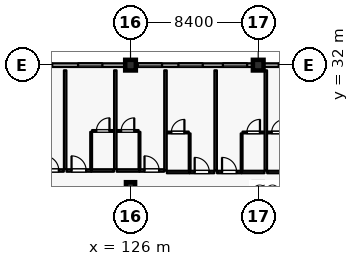
"""IFC4 building model, lengths in metres.
Left out: names, types, materials, properties, quantities, classifications, styles, units other than length and angle.
Written with IfcOpenShell. Run it as: python <this file> out.ifc"""

import sys

from ifc_helpers import new_model, si_unit, direction, frame, frame_2d, origin, origin_2d, place, context, subcontext, project, spatial, rectangle, extrude, element, fill, save


model = new_model("IFC4")
c1 = context("Model", 3, precision=1e-05, world=origin(), true_north=direction((0.0, 1.0)))
c2 = subcontext(c1, "Body", "Model", "MODEL_VIEW")
j1 = project(units=[si_unit("LENGTHUNIT", "METRE"), si_unit("PLANEANGLEUNIT", "RADIAN")], contexts=[c1])
p1 = place(None, origin())
s1 = spatial("IfcSite", under=j1, at=p1, CompositionType="ELEMENT")
p2 = place(p1, origin())
s2 = spatial("IfcBuilding", under=s1, at=p2, CompositionType="ELEMENT")
p3 = place(p2, frame((0.0, 0.0, 32.4)))
s3 = spatial("IfcBuildingStorey", under=s2, at=p3, CompositionType="ELEMENT", Elevation=32.4)
for number, where, z_axis, x_axis in (
    (1, (126.0, 32.0, 0.0), (0.0, 0.0, 1.0), (1.0, 0.0, 0.0)),
    (2, (134.4, 32.0, 0.0), (0.0, 0.0, 1.0), (1.0, 0.0, 0.0)),
):
    element("IfcColumn", number, at=place(p3, frame(where, z_axis=z_axis, x_axis=x_axis)), inside=s3, PredefinedType="COLUMN", context=c2, shape_type="SweptSolid", body=[
        extrude(rectangle(XDim=0.7, YDim=0.7, at=origin_2d()), origin(), (0.0, 0.0, 1.0), 3.6),
    ])
for number, where, z_axis, x_axis in (
    (3, (126.0, 24.0, 0.0), (0.0, 0.0, 1.0), (1.0, 0.0, 0.0)),
    (4, (134.4, 24.0, 0.0), (0.0, 0.0, 1.0), (1.0, 0.0, 0.0)),
):
    element("IfcColumn", number, at=place(p3, frame(where, z_axis=z_axis, x_axis=x_axis)), inside=s3, PredefinedType="COLUMN", context=c2, shape_type="SweptSolid", body=[
        extrude(rectangle(XDim=0.6, YDim=0.6, at=origin_2d()), origin(), (0.0, 0.0, 1.0), 3.6),
    ])
p4 = place(p3, frame((117.95, 32.0, 0.0), z_axis=(0.0, 0.0, 1.0), x_axis=(1.0, 0.0, 0.0)))
e5 = element("IfcWall", 5, at=p4, inside=s3, PredefinedType="SOLIDWALL", context=c2, shape_type="SweptSolid", body=[
    extrude(rectangle(XDim=7.7, YDim=0.24, at=frame_2d((3.85, 0.0))), origin(), (0.0, 0.0, 1.0), 2.94),
])
p5 = place(p4, frame((1.3, 0.0, 0.8)))
e6 = element("IfcOpeningElement", 6, at=p5, cuts=e5, PredefinedType="OPENING", context=c2, shape_type="SweptSolid", body=[
    extrude(rectangle(XDim=1.6, YDim=1.6, at=frame_2d((0.8, 0.8))), frame((0.0, 0.13, 0.0), z_axis=(0.0, -1.0, 0.0), x_axis=(1.0, 0.0, 0.0)), (0.0, 0.0, 1.0), 0.26),
])
p6 = place(p4, frame((4.6, 0.0, 0.8)))
e7 = element("IfcOpeningElement", 7, at=p6, cuts=e5, PredefinedType="OPENING", context=c2, shape_type="SweptSolid", body=[
    extrude(rectangle(XDim=1.6, YDim=1.6, at=frame_2d((0.8, 0.8))), frame((0.0, 0.13, 0.0), z_axis=(0.0, -1.0, 0.0), x_axis=(1.0, 0.0, 0.0)), (0.0, 0.0, 1.0), 0.26),
])
p7 = place(p3, frame((126.35, 32.0, 0.0), z_axis=(0.0, 0.0, 1.0), x_axis=(1.0, 0.0, 0.0)))
e8 = element("IfcWall", 8, at=p7, inside=s3, PredefinedType="SOLIDWALL", context=c2, shape_type="SweptSolid", body=[
    extrude(rectangle(XDim=7.7, YDim=0.24, at=frame_2d((3.85, 0.0))), origin(), (0.0, 0.0, 1.0), 2.94),
])
p8 = place(p7, frame((0.125, 0.0, 0.8)))
e9 = element("IfcOpeningElement", 9, at=p8, cuts=e8, PredefinedType="OPENING", context=c2, shape_type="SweptSolid", body=[
    extrude(rectangle(XDim=1.6, YDim=1.6, at=frame_2d((0.8, 0.8))), frame((0.0, 0.13, 0.0), z_axis=(0.0, -1.0, 0.0), x_axis=(1.0, 0.0, 0.0)), (0.0, 0.0, 1.0), 0.26),
])
p9 = place(p7, frame((2.8, 0.0, 0.8)))
e10 = element("IfcOpeningElement", 10, at=p9, cuts=e8, PredefinedType="OPENING", context=c2, shape_type="SweptSolid", body=[
    extrude(rectangle(XDim=1.6, YDim=1.6, at=frame_2d((0.8, 0.8))), frame((0.0, 0.13, 0.0), z_axis=(0.0, -1.0, 0.0), x_axis=(1.0, 0.0, 0.0)), (0.0, 0.0, 1.0), 0.26),
])
p10 = place(p7, frame((5.725, 0.0, 0.8)))
e11 = element("IfcOpeningElement", 11, at=p10, cuts=e8, PredefinedType="OPENING", context=c2, shape_type="SweptSolid", body=[
    extrude(rectangle(XDim=1.6, YDim=1.6, at=frame_2d((0.8, 0.8))), frame((0.0, 0.13, 0.0), z_axis=(0.0, -1.0, 0.0), x_axis=(1.0, 0.0, 0.0)), (0.0, 0.0, 1.0), 0.26),
])
p11 = place(p3, frame((134.75, 32.0, 0.0), z_axis=(0.0, 0.0, 1.0), x_axis=(1.0, 0.0, 0.0)))
e12 = element("IfcWall", 12, at=p11, inside=s3, PredefinedType="SOLIDWALL", context=c2, shape_type="SweptSolid", body=[
    extrude(rectangle(XDim=7.7, YDim=0.24, at=frame_2d((3.85, 0.0))), origin(), (0.0, 0.0, 1.0), 2.94),
])
p12 = place(p11, frame((1.0, 0.0, 0.8)))
e13 = element("IfcOpeningElement", 13, at=p12, cuts=e12, PredefinedType="OPENING", context=c2, shape_type="SweptSolid", body=[
    extrude(rectangle(XDim=1.6, YDim=1.6, at=frame_2d((0.8, 0.8))), frame((0.0, 0.13, 0.0), z_axis=(0.0, -1.0, 0.0), x_axis=(1.0, 0.0, 0.0)), (0.0, 0.0, 1.0), 0.26),
])
p13 = place(p11, frame((4.3, 0.0, 0.8)))
e14 = element("IfcOpeningElement", 14, at=p13, cuts=e12, PredefinedType="OPENING", context=c2, shape_type="SweptSolid", body=[
    extrude(rectangle(XDim=1.6, YDim=1.6, at=frame_2d((0.8, 0.8))), frame((0.0, 0.13, 0.0), z_axis=(0.0, -1.0, 0.0), x_axis=(1.0, 0.0, 0.0)), (0.0, 0.0, 1.0), 0.26),
])
p14 = place(p3, frame((119.99, 25.07, 0.0), z_axis=(0.0, 0.0, 1.0), x_axis=(1.0, 0.0, 0.0)))
e15 = element("IfcWall", 15, at=p14, inside=s3, PredefinedType="PARTITIONING", context=c2, shape_type="SweptSolid", body=[
    extrude(rectangle(XDim=1.62, YDim=0.16, at=frame_2d((0.81, 0.0))), origin(), (0.0, 0.0, 1.0), 3.335),
])
p15 = place(p14, frame((0.33, 0.0, 0.0)))
e16 = element("IfcOpeningElement", 16, at=p15, cuts=e15, PredefinedType="OPENING", context=c2, shape_type="SweptSolid", body=[
    extrude(rectangle(XDim=0.96, YDim=2.2, at=frame_2d((0.48, 1.1))), frame((0.0, 0.09, 0.0), z_axis=(0.0, -1.0, 0.0), x_axis=(1.0, 0.0, 0.0)), (0.0, 0.0, 1.0), 0.18),
])
p16 = place(p3, frame((121.79, 25.07, 0.0), z_axis=(0.0, 0.0, 1.0), x_axis=(1.0, 0.0, 0.0)))
e17 = element("IfcWall", 17, at=p16, inside=s3, PredefinedType="PARTITIONING", context=c2, shape_type="SweptSolid", body=[
    extrude(rectangle(XDim=1.62, YDim=0.16, at=frame_2d((0.81, 0.0))), origin(), (0.0, 0.0, 1.0), 3.335),
])
p17 = place(p16, frame((0.33, 0.0, 0.0)))
e18 = element("IfcOpeningElement", 18, at=p17, cuts=e17, PredefinedType="OPENING", context=c2, shape_type="SweptSolid", body=[
    extrude(rectangle(XDim=0.96, YDim=2.2, at=frame_2d((0.48, 1.1))), frame((0.0, 0.09, 0.0), z_axis=(0.0, -1.0, 0.0), x_axis=(1.0, 0.0, 0.0)), (0.0, 0.0, 1.0), 0.18),
])
p18 = place(p3, frame((123.42, 25.07, 0.0), z_axis=(0.0, 0.0, 1.0), x_axis=(1.0, 0.0, 0.0)))
e19 = element("IfcWall", 19, at=p18, inside=s3, PredefinedType="PARTITIONING", context=c2, shape_type="SweptSolid", body=[
    extrude(rectangle(XDim=1.49, YDim=0.16, at=frame_2d((0.745, 0.0))), origin(), (0.0, 0.0, 1.0), 3.335),
])
p19 = place(p3, frame((123.41, 25.16, 0.0), z_axis=(0.0, 0.0, 1.0), x_axis=(0.0, 1.0, 0.0)))
e20 = element("IfcWall", 20, at=p19, inside=s3, PredefinedType="PARTITIONING", context=c2, shape_type="SweptSolid", body=[
    extrude(rectangle(XDim=2.45, YDim=0.115, at=frame_2d((1.225, 0.0))), origin(), (0.0, 0.0, 1.0), 3.335),
])
p20 = place(p3, frame((123.47, 27.67, 0.0), z_axis=(0.0, 0.0, 1.0), x_axis=(1.0, 0.0, 0.0)))
e21 = element("IfcWall", 21, at=p20, inside=s3, PredefinedType="PARTITIONING", context=c2, shape_type="SweptSolid", body=[
    extrude(rectangle(XDim=1.43, YDim=0.115, at=frame_2d((0.715, 0.0))), origin(), (0.0, 0.0, 1.0), 3.335),
])
p21 = place(p20, frame((0.285, 0.0, 0.0)))
e22 = element("IfcOpeningElement", 22, at=p21, cuts=e21, PredefinedType="OPENING", context=c2, shape_type="SweptSolid", body=[
    extrude(rectangle(XDim=0.86, YDim=2.12, at=frame_2d((0.43, 1.06))), frame((0.0, 0.067, 0.0), z_axis=(0.0, -1.0, 0.0), x_axis=(1.0, 0.0, 0.0)), (0.0, 0.0, 1.0), 0.135),
])
p22 = place(p3, frame((121.7, 25.16, 0.0), z_axis=(0.0, 0.0, 1.0), x_axis=(0.0, 1.0, 0.0)))
e23 = element("IfcWall", 23, at=p22, inside=s3, PredefinedType="PARTITIONING", context=c2, shape_type="SweptSolid", body=[
    extrude(rectangle(XDim=6.5, YDim=0.16, at=frame_2d((3.25, 0.0))), origin(), (0.0, 0.0, 1.0), 3.335),
])
p23 = place(p3, frame((125.09, 25.07, 0.0), z_axis=(0.0, 0.0, 1.0), x_axis=(1.0, 0.0, 0.0)))
e24 = element("IfcWall", 24, at=p23, inside=s3, PredefinedType="PARTITIONING", context=c2, shape_type="SweptSolid", body=[
    extrude(rectangle(XDim=1.49, YDim=0.16, at=frame_2d((0.745, 0.0))), origin(), (0.0, 0.0, 1.0), 3.335),
])
p24 = place(p3, frame((126.59, 25.07, 0.0), z_axis=(0.0, 0.0, 1.0), x_axis=(1.0, 0.0, 0.0)))
e25 = element("IfcWall", 25, at=p24, inside=s3, PredefinedType="PARTITIONING", context=c2, shape_type="SweptSolid", body=[
    extrude(rectangle(XDim=1.62, YDim=0.16, at=frame_2d((0.81, 0.0))), origin(), (0.0, 0.0, 1.0), 3.335),
])
p25 = place(p24, frame((0.33, 0.0, 0.0)))
e26 = element("IfcOpeningElement", 26, at=p25, cuts=e25, PredefinedType="OPENING", context=c2, shape_type="SweptSolid", body=[
    extrude(rectangle(XDim=0.96, YDim=2.2, at=frame_2d((0.48, 1.1))), frame((0.0, 0.09, 0.0), z_axis=(0.0, -1.0, 0.0), x_axis=(1.0, 0.0, 0.0)), (0.0, 0.0, 1.0), 0.18),
])
p26 = place(p3, frame((126.59, 25.16, 0.0), z_axis=(0.0, 0.0, 1.0), x_axis=(0.0, 1.0, 0.0)))
e27 = element("IfcWall", 27, at=p26, inside=s3, PredefinedType="PARTITIONING", context=c2, shape_type="SweptSolid", body=[
    extrude(rectangle(XDim=2.45, YDim=0.115, at=frame_2d((1.225, 0.0))), origin(), (0.0, 0.0, 1.0), 3.335),
])
p27 = place(p3, frame((125.1, 27.67, 0.0), z_axis=(0.0, 0.0, 1.0), x_axis=(1.0, 0.0, 0.0)))
e28 = element("IfcWall", 28, at=p27, inside=s3, PredefinedType="PARTITIONING", context=c2, shape_type="SweptSolid", body=[
    extrude(rectangle(XDim=1.43, YDim=0.115, at=frame_2d((0.715, 0.0))), origin(), (0.0, 0.0, 1.0), 3.335),
])
p28 = place(p27, frame((0.285, 0.0, 0.0)))
e29 = element("IfcOpeningElement", 29, at=p28, cuts=e28, PredefinedType="OPENING", context=c2, shape_type="SweptSolid", body=[
    extrude(rectangle(XDim=0.86, YDim=2.12, at=frame_2d((0.43, 1.06))), frame((0.0, 0.067, 0.0), z_axis=(0.0, -1.0, 0.0), x_axis=(1.0, 0.0, 0.0)), (0.0, 0.0, 1.0), 0.135),
])
p29 = place(p3, frame((125.0, 25.16, 0.0), z_axis=(0.0, 0.0, 1.0), x_axis=(0.0, 1.0, 0.0)))
e30 = element("IfcWall", 30, at=p29, inside=s3, PredefinedType="PARTITIONING", context=c2, shape_type="SweptSolid", body=[
    extrude(rectangle(XDim=6.5, YDim=0.16, at=frame_2d((3.25, 0.0))), origin(), (0.0, 0.0, 1.0), 3.335),
])
p30 = place(p3, frame((128.39, 24.97, 0.0), z_axis=(0.0, 0.0, 1.0), x_axis=(1.0, 0.0, 0.0)))
e31 = element("IfcWall", 31, at=p30, inside=s3, PredefinedType="PARTITIONING", context=c2, shape_type="SweptSolid", body=[
    extrude(rectangle(XDim=1.49, YDim=0.16, at=frame_2d((0.745, 0.0))), origin(), (0.0, 0.0, 1.0), 3.335),
])
p31 = place(p3, frame((129.89, 24.97, 0.0), z_axis=(0.0, 0.0, 1.0), x_axis=(1.0, 0.0, 0.0)))
e32 = element("IfcWall", 32, at=p31, inside=s3, PredefinedType="PARTITIONING", context=c2, shape_type="SweptSolid", body=[
    extrude(rectangle(XDim=1.62, YDim=0.16, at=frame_2d((0.81, 0.0))), origin(), (0.0, 0.0, 1.0), 3.335),
])
p32 = place(p31, frame((0.33, 0.0, 0.0)))
e33 = element("IfcOpeningElement", 33, at=p32, cuts=e32, PredefinedType="OPENING", context=c2, shape_type="SweptSolid", body=[
    extrude(rectangle(XDim=0.96, YDim=2.2, at=frame_2d((0.48, 1.1))), frame((0.0, 0.09, 0.0), z_axis=(0.0, -1.0, 0.0), x_axis=(1.0, 0.0, 0.0)), (0.0, 0.0, 1.0), 0.18),
])
p33 = place(p3, frame((129.89, 25.06, 0.0), z_axis=(0.0, 0.0, 1.0), x_axis=(0.0, 1.0, 0.0)))
e34 = element("IfcWall", 34, at=p33, inside=s3, PredefinedType="PARTITIONING", context=c2, shape_type="SweptSolid", body=[
    extrude(rectangle(XDim=2.45, YDim=0.115, at=frame_2d((1.225, 0.0))), origin(), (0.0, 0.0, 1.0), 3.335),
])
p34 = place(p3, frame((128.4, 27.57, 0.0), z_axis=(0.0, 0.0, 1.0), x_axis=(1.0, 0.0, 0.0)))
e35 = element("IfcWall", 35, at=p34, inside=s3, PredefinedType="PARTITIONING", context=c2, shape_type="SweptSolid", body=[
    extrude(rectangle(XDim=1.43, YDim=0.115, at=frame_2d((0.715, 0.0))), origin(), (0.0, 0.0, 1.0), 3.335),
])
p35 = place(p34, frame((0.285, 0.0, 0.0)))
e36 = element("IfcOpeningElement", 36, at=p35, cuts=e35, PredefinedType="OPENING", context=c2, shape_type="SweptSolid", body=[
    extrude(rectangle(XDim=0.86, YDim=2.12, at=frame_2d((0.43, 1.06))), frame((0.0, 0.067, 0.0), z_axis=(0.0, -1.0, 0.0), x_axis=(1.0, 0.0, 0.0)), (0.0, 0.0, 1.0), 0.135),
])
p36 = place(p3, frame((128.3, 25.06, 0.0), z_axis=(0.0, 0.0, 1.0), x_axis=(0.0, 1.0, 0.0)))
e37 = element("IfcWall", 37, at=p36, inside=s3, PredefinedType="PARTITIONING", context=c2, shape_type="SweptSolid", body=[
    extrude(rectangle(XDim=6.6, YDim=0.16, at=frame_2d((3.3, 0.0))), origin(), (0.0, 0.0, 1.0), 3.335),
])
p37 = place(p3, frame((131.69, 24.97, 0.0), z_axis=(0.0, 0.0, 1.0), x_axis=(1.0, 0.0, 0.0)))
e38 = element("IfcWall", 38, at=p37, inside=s3, PredefinedType="PARTITIONING", context=c2, shape_type="SweptSolid", body=[
    extrude(rectangle(XDim=1.62, YDim=0.16, at=frame_2d((0.81, 0.0))), origin(), (0.0, 0.0, 1.0), 3.335),
])
p38 = place(p37, frame((0.33, 0.0, 0.0)))
e39 = element("IfcOpeningElement", 39, at=p38, cuts=e38, PredefinedType="OPENING", context=c2, shape_type="SweptSolid", body=[
    extrude(rectangle(XDim=0.96, YDim=2.2, at=frame_2d((0.48, 1.1))), frame((0.0, 0.09, 0.0), z_axis=(0.0, -1.0, 0.0), x_axis=(1.0, 0.0, 0.0)), (0.0, 0.0, 1.0), 0.18),
])
p39 = place(p3, frame((133.32, 24.97, 0.0), z_axis=(0.0, 0.0, 1.0), x_axis=(1.0, 0.0, 0.0)))
e40 = element("IfcWall", 40, at=p39, inside=s3, PredefinedType="PARTITIONING", context=c2, shape_type="SweptSolid", body=[
    extrude(rectangle(XDim=1.49, YDim=0.16, at=frame_2d((0.745, 0.0))), origin(), (0.0, 0.0, 1.0), 3.335),
])
p40 = place(p3, frame((133.31, 25.06, 0.0), z_axis=(0.0, 0.0, 1.0), x_axis=(0.0, 1.0, 0.0)))
e41 = element("IfcWall", 41, at=p40, inside=s3, PredefinedType="PARTITIONING", context=c2, shape_type="SweptSolid", body=[
    extrude(rectangle(XDim=2.45, YDim=0.115, at=frame_2d((1.225, 0.0))), origin(), (0.0, 0.0, 1.0), 3.335),
])
p41 = place(p3, frame((133.37, 27.57, 0.0), z_axis=(0.0, 0.0, 1.0), x_axis=(1.0, 0.0, 0.0)))
e42 = element("IfcWall", 42, at=p41, inside=s3, PredefinedType="PARTITIONING", context=c2, shape_type="SweptSolid", body=[
    extrude(rectangle(XDim=1.43, YDim=0.115, at=frame_2d((0.715, 0.0))), origin(), (0.0, 0.0, 1.0), 3.335),
])
p42 = place(p41, frame((0.285, 0.0, 0.0)))
e43 = element("IfcOpeningElement", 43, at=p42, cuts=e42, PredefinedType="OPENING", context=c2, shape_type="SweptSolid", body=[
    extrude(rectangle(XDim=0.86, YDim=2.12, at=frame_2d((0.43, 1.06))), frame((0.0, 0.067, 0.0), z_axis=(0.0, -1.0, 0.0), x_axis=(1.0, 0.0, 0.0)), (0.0, 0.0, 1.0), 0.135),
])
p43 = place(p3, frame((131.6, 25.06, 0.0), z_axis=(0.0, 0.0, 1.0), x_axis=(0.0, 1.0, 0.0)))
e44 = element("IfcWall", 44, at=p43, inside=s3, PredefinedType="PARTITIONING", context=c2, shape_type="SweptSolid", body=[
    extrude(rectangle(XDim=6.6, YDim=0.16, at=frame_2d((3.3, 0.0))), origin(), (0.0, 0.0, 1.0), 3.335),
])
p44 = place(p3, frame((134.99, 24.97, 0.0), z_axis=(0.0, 0.0, 1.0), x_axis=(1.0, 0.0, 0.0)))
e45 = element("IfcWall", 45, at=p44, inside=s3, PredefinedType="PARTITIONING", context=c2, shape_type="SweptSolid", body=[
    extrude(rectangle(XDim=1.49, YDim=0.16, at=frame_2d((0.745, 0.0))), origin(), (0.0, 0.0, 1.0), 3.335),
])
p45 = place(p3, frame((135.0, 27.57, 0.0), z_axis=(0.0, 0.0, 1.0), x_axis=(1.0, 0.0, 0.0)))
e46 = element("IfcWall", 46, at=p45, inside=s3, PredefinedType="PARTITIONING", context=c2, shape_type="SweptSolid", body=[
    extrude(rectangle(XDim=1.43, YDim=0.115, at=frame_2d((0.715, 0.0))), origin(), (0.0, 0.0, 1.0), 3.335),
])
p46 = place(p45, frame((0.285, 0.0, 0.0)))
e47 = element("IfcOpeningElement", 47, at=p46, cuts=e46, PredefinedType="OPENING", context=c2, shape_type="SweptSolid", body=[
    extrude(rectangle(XDim=0.86, YDim=2.12, at=frame_2d((0.43, 1.06))), frame((0.0, 0.067, 0.0), z_axis=(0.0, -1.0, 0.0), x_axis=(1.0, 0.0, 0.0)), (0.0, 0.0, 1.0), 0.135),
])
p47 = place(p3, frame((134.9, 25.06, 0.0), z_axis=(0.0, 0.0, 1.0), x_axis=(0.0, 1.0, 0.0)))
e48 = element("IfcWall", 48, at=p47, inside=s3, PredefinedType="PARTITIONING", context=c2, shape_type="SweptSolid", body=[
    extrude(rectangle(XDim=6.6, YDim=0.16, at=frame_2d((3.3, 0.0))), origin(), (0.0, 0.0, 1.0), 3.335),
])
p48 = place(p5, origin())
e49 = element("IfcWindow", 49, at=p48, inside=s3, PartitioningType="SINGLE_PANEL", PredefinedType="WINDOW", context=c2, shape_type="SweptSolid", body=[
    extrude(rectangle(XDim=1.6, YDim=1.6, at=frame_2d((0.8, 0.8))), frame((0.0, 0.03, 0.0), z_axis=(0.0, -1.0, 0.0), x_axis=(1.0, 0.0, 0.0)), (0.0, 0.0, 1.0), 0.06),
])
fill(e6, e49)
p49 = place(p6, origin())
e50 = element("IfcWindow", 50, at=p49, inside=s3, PartitioningType="SINGLE_PANEL", PredefinedType="WINDOW", context=c2, shape_type="SweptSolid", body=[
    extrude(rectangle(XDim=1.6, YDim=1.6, at=frame_2d((0.8, 0.8))), frame((0.0, 0.03, 0.0), z_axis=(0.0, -1.0, 0.0), x_axis=(1.0, 0.0, 0.0)), (0.0, 0.0, 1.0), 0.06),
])
fill(e7, e50)
p50 = place(p8, origin())
e51 = element("IfcWindow", 51, at=p50, inside=s3, PartitioningType="SINGLE_PANEL", PredefinedType="WINDOW", context=c2, shape_type="SweptSolid", body=[
    extrude(rectangle(XDim=1.6, YDim=1.6, at=frame_2d((0.8, 0.8))), frame((0.0, 0.03, 0.0), z_axis=(0.0, -1.0, 0.0), x_axis=(1.0, 0.0, 0.0)), (0.0, 0.0, 1.0), 0.06),
])
fill(e9, e51)
p51 = place(p9, origin())
e52 = element("IfcWindow", 52, at=p51, inside=s3, PartitioningType="SINGLE_PANEL", PredefinedType="WINDOW", context=c2, shape_type="SweptSolid", body=[
    extrude(rectangle(XDim=1.6, YDim=1.6, at=frame_2d((0.8, 0.8))), frame((0.0, 0.03, 0.0), z_axis=(0.0, -1.0, 0.0), x_axis=(1.0, 0.0, 0.0)), (0.0, 0.0, 1.0), 0.06),
])
fill(e10, e52)
p52 = place(p10, origin())
e53 = element("IfcWindow", 53, at=p52, inside=s3, PartitioningType="SINGLE_PANEL", PredefinedType="WINDOW", context=c2, shape_type="SweptSolid", body=[
    extrude(rectangle(XDim=1.6, YDim=1.6, at=frame_2d((0.8, 0.8))), frame((0.0, 0.03, 0.0), z_axis=(0.0, -1.0, 0.0), x_axis=(1.0, 0.0, 0.0)), (0.0, 0.0, 1.0), 0.06),
])
fill(e11, e53)
p53 = place(p12, origin())
e54 = element("IfcWindow", 54, at=p53, inside=s3, PartitioningType="SINGLE_PANEL", PredefinedType="WINDOW", context=c2, shape_type="SweptSolid", body=[
    extrude(rectangle(XDim=1.6, YDim=1.6, at=frame_2d((0.8, 0.8))), frame((0.0, 0.03, 0.0), z_axis=(0.0, -1.0, 0.0), x_axis=(1.0, 0.0, 0.0)), (0.0, 0.0, 1.0), 0.06),
])
fill(e13, e54)
p54 = place(p15, origin())
e55 = element("IfcDoor", 55, at=p54, inside=s3, OperationType="SINGLE_SWING_LEFT", PredefinedType="DOOR", context=c2, shape_type="SweptSolid", body=[
    extrude(rectangle(XDim=0.96, YDim=2.2, at=frame_2d((0.48, 1.1))), frame((0.0, 0.025, 0.0), z_axis=(0.0, -1.0, 0.0), x_axis=(1.0, 0.0, 0.0)), (0.0, 0.0, 1.0), 0.05),
])
fill(e16, e55)
p55 = place(p17, origin())
e56 = element("IfcDoor", 56, at=p55, inside=s3, OperationType="SINGLE_SWING_LEFT", PredefinedType="DOOR", context=c2, shape_type="SweptSolid", body=[
    extrude(rectangle(XDim=0.96, YDim=2.2, at=frame_2d((0.48, 1.1))), frame((0.0, 0.025, 0.0), z_axis=(0.0, -1.0, 0.0), x_axis=(1.0, 0.0, 0.0)), (0.0, 0.0, 1.0), 0.05),
])
fill(e18, e56)
p56 = place(p21, origin())
e57 = element("IfcDoor", 57, at=p56, inside=s3, OperationType="SINGLE_SWING_RIGHT", PredefinedType="DOOR", context=c2, shape_type="SweptSolid", body=[
    extrude(rectangle(XDim=0.86, YDim=2.12, at=frame_2d((0.43, 1.06))), frame((0.0, 0.025, 0.0), z_axis=(0.0, -1.0, 0.0), x_axis=(1.0, 0.0, 0.0)), (0.0, 0.0, 1.0), 0.05),
])
fill(e22, e57)
p57 = place(p25, origin())
e58 = element("IfcDoor", 58, at=p57, inside=s3, OperationType="SINGLE_SWING_LEFT", PredefinedType="DOOR", context=c2, shape_type="SweptSolid", body=[
    extrude(rectangle(XDim=0.96, YDim=2.2, at=frame_2d((0.48, 1.1))), frame((0.0, 0.025, 0.0), z_axis=(0.0, -1.0, 0.0), x_axis=(1.0, 0.0, 0.0)), (0.0, 0.0, 1.0), 0.05),
])
fill(e26, e58)
p58 = place(p28, origin())
e59 = element("IfcDoor", 59, at=p58, inside=s3, OperationType="SINGLE_SWING_RIGHT", PredefinedType="DOOR", context=c2, shape_type="SweptSolid", body=[
    extrude(rectangle(XDim=0.86, YDim=2.12, at=frame_2d((0.43, 1.06))), frame((0.0, 0.025, 0.0), z_axis=(0.0, -1.0, 0.0), x_axis=(1.0, 0.0, 0.0)), (0.0, 0.0, 1.0), 0.05),
])
fill(e29, e59)
p59 = place(p32, origin())
e60 = element("IfcDoor", 60, at=p59, inside=s3, OperationType="SINGLE_SWING_LEFT", PredefinedType="DOOR", context=c2, shape_type="SweptSolid", body=[
    extrude(rectangle(XDim=0.96, YDim=2.2, at=frame_2d((0.48, 1.1))), frame((0.0, 0.025, 0.0), z_axis=(0.0, -1.0, 0.0), x_axis=(1.0, 0.0, 0.0)), (0.0, 0.0, 1.0), 0.05),
])
fill(e33, e60)
p60 = place(p35, origin())
e61 = element("IfcDoor", 61, at=p60, inside=s3, OperationType="SINGLE_SWING_RIGHT", PredefinedType="DOOR", context=c2, shape_type="SweptSolid", body=[
    extrude(rectangle(XDim=0.86, YDim=2.12, at=frame_2d((0.43, 1.06))), frame((0.0, 0.025, 0.0), z_axis=(0.0, -1.0, 0.0), x_axis=(1.0, 0.0, 0.0)), (0.0, 0.0, 1.0), 0.05),
])
fill(e36, e61)
p61 = place(p38, origin())
e62 = element("IfcDoor", 62, at=p61, inside=s3, OperationType="SINGLE_SWING_LEFT", PredefinedType="DOOR", context=c2, shape_type="SweptSolid", body=[
    extrude(rectangle(XDim=0.96, YDim=2.2, at=frame_2d((0.48, 1.1))), frame((0.0, 0.025, 0.0), z_axis=(0.0, -1.0, 0.0), x_axis=(1.0, 0.0, 0.0)), (0.0, 0.0, 1.0), 0.05),
])
fill(e39, e62)
p62 = place(p42, origin())
e63 = element("IfcDoor", 63, at=p62, inside=s3, OperationType="SINGLE_SWING_RIGHT", PredefinedType="DOOR", context=c2, shape_type="SweptSolid", body=[
    extrude(rectangle(XDim=0.86, YDim=2.12, at=frame_2d((0.43, 1.06))), frame((0.0, 0.025, 0.0), z_axis=(0.0, -1.0, 0.0), x_axis=(1.0, 0.0, 0.0)), (0.0, 0.0, 1.0), 0.05),
])
fill(e43, e63)
p63 = place(p46, origin())
e64 = element("IfcDoor", 64, at=p63, inside=s3, OperationType="SINGLE_SWING_RIGHT", PredefinedType="DOOR", context=c2, shape_type="SweptSolid", body=[
    extrude(rectangle(XDim=0.86, YDim=2.12, at=frame_2d((0.43, 1.06))), frame((0.0, 0.025, 0.0), z_axis=(0.0, -1.0, 0.0), x_axis=(1.0, 0.0, 0.0)), (0.0, 0.0, 1.0), 0.05),
])
fill(e47, e64)
save(model, sys.argv[1])
